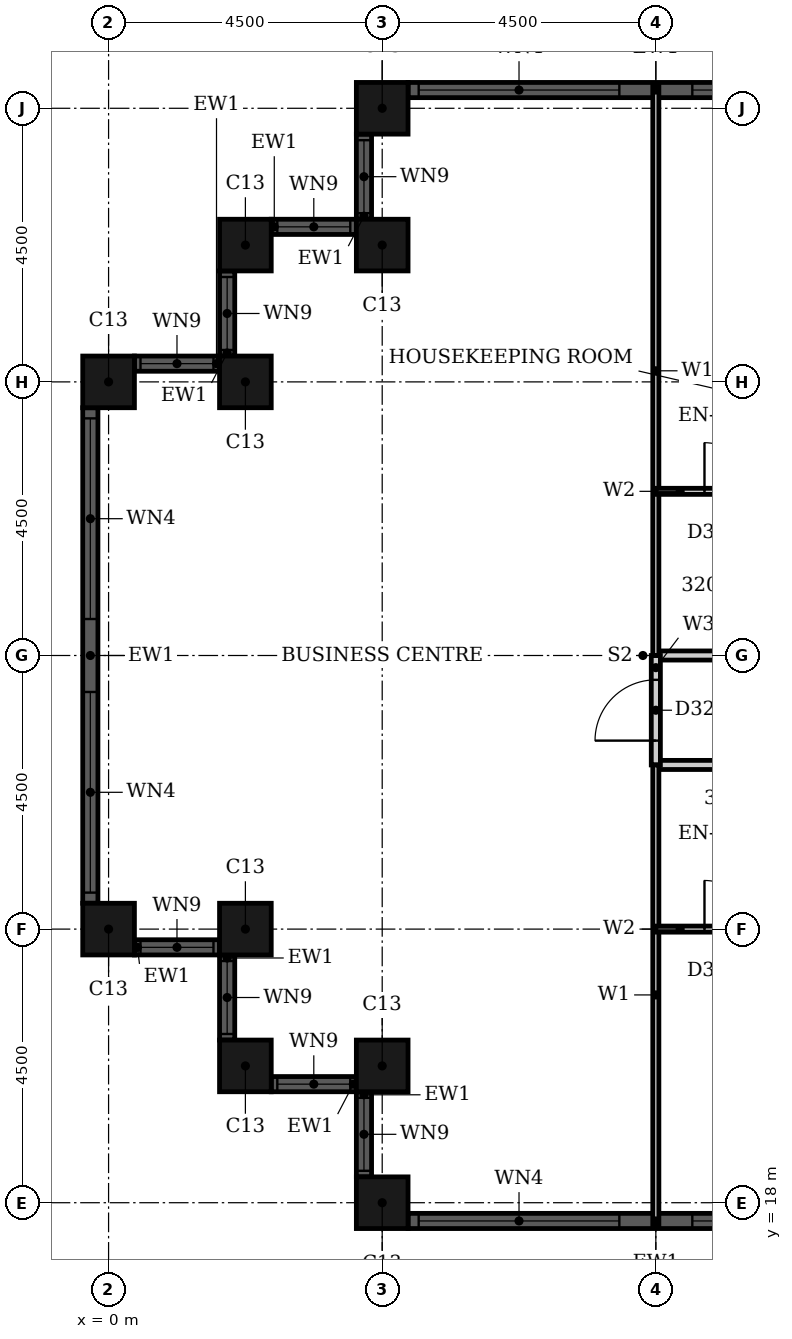
"""IFC4 building model, lengths in metres.
Left out: names, types, materials, properties, quantities, classifications, styles, units other than length and angle.
Written with IfcOpenShell. Run it as: python <this file> out.ifc"""

import sys

from ifc_helpers import new_model, si_unit, direction, frame, frame_2d, origin, origin_2d, place, context, subcontext, project, spatial, rectangle, hollow_rectangle, extrude, element, fill, save


model = new_model("IFC4")
c1 = context("Model", 3, precision=1e-05, world=origin(), true_north=direction((0.0, 1.0)))
c2 = subcontext(c1, "Body", "Model", "MODEL_VIEW")
j1 = project(units=[si_unit("LENGTHUNIT", "METRE"), si_unit("PLANEANGLEUNIT", "RADIAN")], contexts=[c1])
p1 = place(None, origin())
s1 = spatial("IfcSite", under=j1, at=p1, CompositionType="ELEMENT")
p2 = place(p1, origin())
s2 = spatial("IfcBuilding", under=s1, at=p2, CompositionType="ELEMENT")
p3 = place(p2, frame((0.0, 0.0, 129.6)))
s3 = spatial("IfcBuildingStorey", under=s2, at=p3, CompositionType="ELEMENT", Elevation=129.6)
for number, where, z_axis, x_axis in (
    (1, (4.5, 36.0, 0.0), (0.0, 0.0, 1.0), (1.0, 0.0, 0.0)),
    (2, (4.5, 33.75, 0.0), (0.0, 0.0, 1.0), (1.0, 0.0, 0.0)),
    (3, (2.25, 33.75, 0.0), (0.0, 0.0, 1.0), (1.0, 0.0, 0.0)),
    (4, (2.25, 31.5, 0.0), (0.0, 0.0, 1.0), (1.0, 0.0, 0.0)),
    (5, (0.0, 31.5, 0.0), (0.0, 0.0, 1.0), (1.0, 0.0, 0.0)),
    (6, (0.0, 22.5, 0.0), (0.0, 0.0, 1.0), (1.0, 0.0, 0.0)),
    (7, (2.25, 22.5, 0.0), (0.0, 0.0, 1.0), (1.0, 0.0, 0.0)),
    (8, (2.25, 20.25, 0.0), (0.0, 0.0, 1.0), (1.0, 0.0, 0.0)),
    (9, (4.5, 20.25, 0.0), (0.0, 0.0, 1.0), (1.0, 0.0, 0.0)),
    (10, (4.5, 18.0, 0.0), (0.0, 0.0, 1.0), (1.0, 0.0, 0.0)),
):
    element("IfcColumn", number, at=place(p3, frame(where, z_axis=z_axis, x_axis=x_axis)), inside=s3, PredefinedType="COLUMN", context=c2, shape_type="SweptSolid", body=[
        extrude(hollow_rectangle(XDim=0.85, YDim=0.85, WallThickness=0.026, at=origin_2d()), origin(), (0.0, 0.0, 1.0), 3.6),
    ])
p4 = place(p3, frame((13.075, 36.3, 0.0), z_axis=(0.0, 0.0, 1.0), x_axis=(-1.0, 0.0, 0.0)))
e11 = element("IfcWall", 11, at=p4, inside=s3, PredefinedType="SOLIDWALL", context=c2, shape_type="SweptSolid", body=[
    extrude(rectangle(XDim=8.15, YDim=0.25, at=frame_2d((4.075, 0.0))), origin(), (0.0, 0.0, 1.0), 3.6),
])
p5 = place(p4, frame((0.175, 0.0, 0.9)))
e12 = element("IfcOpeningElement", 12, at=p5, cuts=e11, PredefinedType="OPENING", context=c2, shape_type="SweptSolid", body=[
    extrude(rectangle(XDim=3.3, YDim=2.08, at=frame_2d((1.65, 1.04))), frame((0.0, 0.135, 0.0), z_axis=(0.0, -1.0, 0.0), x_axis=(1.0, 0.0, 0.0)), (0.0, 0.0, 1.0), 0.27),
])
p6 = place(p4, frame((4.675, 0.0, 0.9)))
e13 = element("IfcOpeningElement", 13, at=p6, cuts=e11, PredefinedType="OPENING", context=c2, shape_type="SweptSolid", body=[
    extrude(rectangle(XDim=3.3, YDim=2.08, at=frame_2d((1.65, 1.04))), frame((0.0, 0.135, 0.0), z_axis=(0.0, -1.0, 0.0), x_axis=(1.0, 0.0, 0.0)), (0.0, 0.0, 1.0), 0.27),
])
p7 = place(p3, frame((4.2, 35.575, 0.0), z_axis=(0.0, 0.0, 1.0), x_axis=(0.0, -1.0, 0.0)))
e14 = element("IfcWall", 14, at=p7, inside=s3, PredefinedType="SOLIDWALL", context=c2, shape_type="SweptSolid", body=[
    extrude(rectangle(XDim=1.4, YDim=0.25, at=frame_2d((0.7, 0.0))), origin(), (0.0, 0.0, 1.0), 3.6),
])
p8 = place(p7, frame((0.1, 0.0, 0.9)))
e15 = element("IfcOpeningElement", 15, at=p8, cuts=e14, PredefinedType="OPENING", context=c2, shape_type="SweptSolid", body=[
    extrude(rectangle(XDim=1.2, YDim=2.08, at=frame_2d((0.6, 1.04))), frame((0.0, 0.135, 0.0), z_axis=(0.0, -1.0, 0.0), x_axis=(1.0, 0.0, 0.0)), (0.0, 0.0, 1.0), 0.27),
])
p9 = place(p3, frame((4.075, 34.05, 0.0), z_axis=(0.0, 0.0, 1.0), x_axis=(-1.0, 0.0, 0.0)))
e16 = element("IfcWall", 16, at=p9, inside=s3, PredefinedType="SOLIDWALL", context=c2, shape_type="SweptSolid", body=[
    extrude(rectangle(XDim=1.4, YDim=0.25, at=frame_2d((0.7, 0.0))), origin(), (0.0, 0.0, 1.0), 3.6),
])
p10 = place(p9, frame((0.1, 0.0, 0.9)))
e17 = element("IfcOpeningElement", 17, at=p10, cuts=e16, PredefinedType="OPENING", context=c2, shape_type="SweptSolid", body=[
    extrude(rectangle(XDim=1.2, YDim=2.08, at=frame_2d((0.6, 1.04))), frame((0.0, 0.135, 0.0), z_axis=(0.0, -1.0, 0.0), x_axis=(1.0, 0.0, 0.0)), (0.0, 0.0, 1.0), 0.27),
])
p11 = place(p3, frame((1.95, 33.325, 0.0), z_axis=(0.0, 0.0, 1.0), x_axis=(0.0, -1.0, 0.0)))
e18 = element("IfcWall", 18, at=p11, inside=s3, PredefinedType="SOLIDWALL", context=c2, shape_type="SweptSolid", body=[
    extrude(rectangle(XDim=1.4, YDim=0.25, at=frame_2d((0.7, 0.0))), origin(), (0.0, 0.0, 1.0), 3.6),
])
p12 = place(p11, frame((0.1, 0.0, 0.9)))
e19 = element("IfcOpeningElement", 19, at=p12, cuts=e18, PredefinedType="OPENING", context=c2, shape_type="SweptSolid", body=[
    extrude(rectangle(XDim=1.2, YDim=2.08, at=frame_2d((0.6, 1.04))), frame((0.0, 0.135, 0.0), z_axis=(0.0, -1.0, 0.0), x_axis=(1.0, 0.0, 0.0)), (0.0, 0.0, 1.0), 0.27),
])
p13 = place(p3, frame((1.825, 31.8, 0.0), z_axis=(0.0, 0.0, 1.0), x_axis=(-1.0, 0.0, 0.0)))
e20 = element("IfcWall", 20, at=p13, inside=s3, PredefinedType="SOLIDWALL", context=c2, shape_type="SweptSolid", body=[
    extrude(rectangle(XDim=1.4, YDim=0.25, at=frame_2d((0.7, 0.0))), origin(), (0.0, 0.0, 1.0), 3.6),
])
p14 = place(p13, frame((0.1, 0.0, 0.9)))
e21 = element("IfcOpeningElement", 21, at=p14, cuts=e20, PredefinedType="OPENING", context=c2, shape_type="SweptSolid", body=[
    extrude(rectangle(XDim=1.2, YDim=2.08, at=frame_2d((0.6, 1.04))), frame((0.0, 0.135, 0.0), z_axis=(0.0, -1.0, 0.0), x_axis=(1.0, 0.0, 0.0)), (0.0, 0.0, 1.0), 0.27),
])
p15 = place(p3, frame((-0.3, 31.075, 0.0), z_axis=(0.0, 0.0, 1.0), x_axis=(0.0, -1.0, 0.0)))
e22 = element("IfcWall", 22, at=p15, inside=s3, PredefinedType="SOLIDWALL", context=c2, shape_type="SweptSolid", body=[
    extrude(rectangle(XDim=8.15, YDim=0.25, at=frame_2d((4.075, 0.0))), origin(), (0.0, 0.0, 1.0), 3.6),
])
p16 = place(p15, frame((0.175, 0.0, 0.9)))
e23 = element("IfcOpeningElement", 23, at=p16, cuts=e22, PredefinedType="OPENING", context=c2, shape_type="SweptSolid", body=[
    extrude(rectangle(XDim=3.3, YDim=2.08, at=frame_2d((1.65, 1.04))), frame((0.0, 0.135, 0.0), z_axis=(0.0, -1.0, 0.0), x_axis=(1.0, 0.0, 0.0)), (0.0, 0.0, 1.0), 0.27),
])
p17 = place(p15, frame((4.675, 0.0, 0.9)))
e24 = element("IfcOpeningElement", 24, at=p17, cuts=e22, PredefinedType="OPENING", context=c2, shape_type="SweptSolid", body=[
    extrude(rectangle(XDim=3.3, YDim=2.08, at=frame_2d((1.65, 1.04))), frame((0.0, 0.135, 0.0), z_axis=(0.0, -1.0, 0.0), x_axis=(1.0, 0.0, 0.0)), (0.0, 0.0, 1.0), 0.27),
])
p18 = place(p3, frame((0.425, 22.2, 0.0), z_axis=(0.0, 0.0, 1.0), x_axis=(1.0, 0.0, 0.0)))
e25 = element("IfcWall", 25, at=p18, inside=s3, PredefinedType="SOLIDWALL", context=c2, shape_type="SweptSolid", body=[
    extrude(rectangle(XDim=1.4, YDim=0.25, at=frame_2d((0.7, 0.0))), origin(), (0.0, 0.0, 1.0), 3.6),
])
p19 = place(p18, frame((0.1, 0.0, 0.9)))
e26 = element("IfcOpeningElement", 26, at=p19, cuts=e25, PredefinedType="OPENING", context=c2, shape_type="SweptSolid", body=[
    extrude(rectangle(XDim=1.2, YDim=2.08, at=frame_2d((0.6, 1.04))), frame((0.0, 0.135, 0.0), z_axis=(0.0, -1.0, 0.0), x_axis=(1.0, 0.0, 0.0)), (0.0, 0.0, 1.0), 0.27),
])
p20 = place(p3, frame((1.95, 22.075, 0.0), z_axis=(0.0, 0.0, 1.0), x_axis=(0.0, -1.0, 0.0)))
e27 = element("IfcWall", 27, at=p20, inside=s3, PredefinedType="SOLIDWALL", context=c2, shape_type="SweptSolid", body=[
    extrude(rectangle(XDim=1.4, YDim=0.25, at=frame_2d((0.7, 0.0))), origin(), (0.0, 0.0, 1.0), 3.6),
])
p21 = place(p20, frame((0.1, 0.0, 0.9)))
e28 = element("IfcOpeningElement", 28, at=p21, cuts=e27, PredefinedType="OPENING", context=c2, shape_type="SweptSolid", body=[
    extrude(rectangle(XDim=1.2, YDim=2.08, at=frame_2d((0.6, 1.04))), frame((0.0, 0.135, 0.0), z_axis=(0.0, -1.0, 0.0), x_axis=(1.0, 0.0, 0.0)), (0.0, 0.0, 1.0), 0.27),
])
p22 = place(p3, frame((2.675, 19.95, 0.0), z_axis=(0.0, 0.0, 1.0), x_axis=(1.0, 0.0, 0.0)))
e29 = element("IfcWall", 29, at=p22, inside=s3, PredefinedType="SOLIDWALL", context=c2, shape_type="SweptSolid", body=[
    extrude(rectangle(XDim=1.4, YDim=0.25, at=frame_2d((0.7, 0.0))), origin(), (0.0, 0.0, 1.0), 3.6),
])
p23 = place(p22, frame((0.1, 0.0, 0.9)))
e30 = element("IfcOpeningElement", 30, at=p23, cuts=e29, PredefinedType="OPENING", context=c2, shape_type="SweptSolid", body=[
    extrude(rectangle(XDim=1.2, YDim=2.08, at=frame_2d((0.6, 1.04))), frame((0.0, 0.135, 0.0), z_axis=(0.0, -1.0, 0.0), x_axis=(1.0, 0.0, 0.0)), (0.0, 0.0, 1.0), 0.27),
])
p24 = place(p3, frame((4.2, 19.825, 0.0), z_axis=(0.0, 0.0, 1.0), x_axis=(0.0, -1.0, 0.0)))
e31 = element("IfcWall", 31, at=p24, inside=s3, PredefinedType="SOLIDWALL", context=c2, shape_type="SweptSolid", body=[
    extrude(rectangle(XDim=1.4, YDim=0.25, at=frame_2d((0.7, 0.0))), origin(), (0.0, 0.0, 1.0), 3.6),
])
p25 = place(p24, frame((0.1, 0.0, 0.9)))
e32 = element("IfcOpeningElement", 32, at=p25, cuts=e31, PredefinedType="OPENING", context=c2, shape_type="SweptSolid", body=[
    extrude(rectangle(XDim=1.2, YDim=2.08, at=frame_2d((0.6, 1.04))), frame((0.0, 0.135, 0.0), z_axis=(0.0, -1.0, 0.0), x_axis=(1.0, 0.0, 0.0)), (0.0, 0.0, 1.0), 0.27),
])
p26 = place(p3, frame((4.925, 17.7, 0.0), z_axis=(0.0, 0.0, 1.0), x_axis=(1.0, 0.0, 0.0)))
e33 = element("IfcWall", 33, at=p26, inside=s3, PredefinedType="SOLIDWALL", context=c2, shape_type="SweptSolid", body=[
    extrude(rectangle(XDim=8.15, YDim=0.25, at=frame_2d((4.075, 0.0))), origin(), (0.0, 0.0, 1.0), 3.6),
])
p27 = place(p26, frame((0.175, 0.0, 0.9)))
e34 = element("IfcOpeningElement", 34, at=p27, cuts=e33, PredefinedType="OPENING", context=c2, shape_type="SweptSolid", body=[
    extrude(rectangle(XDim=3.3, YDim=2.08, at=frame_2d((1.65, 1.04))), frame((0.0, 0.135, 0.0), z_axis=(0.0, -1.0, 0.0), x_axis=(1.0, 0.0, 0.0)), (0.0, 0.0, 1.0), 0.27),
])
p28 = place(p26, frame((4.675, 0.0, 0.9)))
e35 = element("IfcOpeningElement", 35, at=p28, cuts=e33, PredefinedType="OPENING", context=c2, shape_type="SweptSolid", body=[
    extrude(rectangle(XDim=3.3, YDim=2.08, at=frame_2d((1.65, 1.04))), frame((0.0, 0.135, 0.0), z_axis=(0.0, -1.0, 0.0), x_axis=(1.0, 0.0, 0.0)), (0.0, 0.0, 1.0), 0.27),
])
p29 = place(p3, frame((9.0, 25.2, 0.0), z_axis=(0.0, 0.0, 1.0), x_axis=(1.0, 0.0, 0.0)))
e36 = element("IfcWall", 36, at=p29, inside=s3, PredefinedType="PARTITIONING", context=c2, shape_type="SweptSolid", body=[
    extrude(rectangle(XDim=7.2, YDim=0.15, at=frame_2d((3.6, 0.0))), origin(), (0.0, 0.0, 1.0), 3.3),
])
p30 = place(p29, frame((2.95, 0.0, 0.0)))
e37 = element("IfcOpeningElement", 37, at=p30, cuts=e36, PredefinedType="OPENING", context=c2, shape_type="SweptSolid", body=[
    extrude(rectangle(XDim=1.0, YDim=2.1, at=frame_2d((0.5, 1.05))), frame((0.0, 0.085, 0.0), z_axis=(0.0, -1.0, 0.0), x_axis=(1.0, 0.0, 0.0)), (0.0, 0.0, 1.0), 0.17),
])
p31 = place(p3, frame((9.0, 27.0, 0.0), z_axis=(0.0, 0.0, 1.0), x_axis=(1.0, 0.0, 0.0)))
e38 = element("IfcWall", 38, at=p31, inside=s3, PredefinedType="PARTITIONING", context=c2, shape_type="SweptSolid", body=[
    extrude(rectangle(XDim=7.2, YDim=0.15, at=frame_2d((3.6, 0.0))), origin(), (0.0, 0.0, 1.0), 2.58),
])
p32 = place(p31, frame((2.95, 0.0, 0.0)))
e39 = element("IfcOpeningElement", 39, at=p32, cuts=e38, PredefinedType="OPENING", context=c2, shape_type="SweptSolid", body=[
    extrude(rectangle(XDim=1.0, YDim=2.1, at=frame_2d((0.5, 1.05))), frame((0.0, 0.085, 0.0), z_axis=(0.0, -1.0, 0.0), x_axis=(1.0, 0.0, 0.0)), (0.0, 0.0, 1.0), 0.17),
])
p33 = place(p3, frame((9.0, 25.2, 0.0), z_axis=(0.0, 0.0, 1.0), x_axis=(0.0, 1.0, 0.0)))
e40 = element("IfcWall", 40, at=p33, inside=s3, PredefinedType="PARTITIONING", context=c2, shape_type="SweptSolid", body=[
    extrude(rectangle(XDim=1.8, YDim=0.15, at=frame_2d((0.9, 0.0))), origin(), (0.0, 0.0, 1.0), 3.3),
])
p34 = place(p33, frame((0.4, 0.0, 0.0)))
e41 = element("IfcOpeningElement", 41, at=p34, cuts=e40, PredefinedType="OPENING", context=c2, shape_type="SweptSolid", body=[
    extrude(rectangle(XDim=1.0, YDim=2.1, at=frame_2d((0.5, 1.05))), frame((0.0, 0.085, 0.0), z_axis=(0.0, -1.0, 0.0), x_axis=(1.0, 0.0, 0.0)), (0.0, 0.0, 1.0), 0.17),
])
p35 = place(p3, frame((9.0, 27.0, 0.0), z_axis=(0.0, 0.0, 1.0), x_axis=(0.0, 1.0, 0.0)))
e42 = element("IfcWall", 42, at=p35, inside=s3, PredefinedType="PARTITIONING", context=c2, shape_type="SweptSolid", body=[
    extrude(rectangle(XDim=9.365, YDim=0.1, at=frame_2d((4.683, 0.0))), origin(), (0.0, 0.0, 1.0), 3.3),
])
p36 = place(p3, frame((9.0, 17.635, 0.0), z_axis=(0.0, 0.0, 1.0), x_axis=(0.0, 1.0, 0.0)))
e43 = element("IfcWall", 43, at=p36, inside=s3, PredefinedType="PARTITIONING", context=c2, shape_type="SweptSolid", body=[
    extrude(rectangle(XDim=7.565, YDim=0.1, at=frame_2d((3.782, 0.0))), origin(), (0.0, 0.0, 1.0), 3.3),
])
p37 = place(p3, frame((9.0, 22.5, 0.0), z_axis=(0.0, 0.0, 1.0), x_axis=(1.0, 0.0, 0.0)))
e44 = element("IfcWall", 44, at=p37, inside=s3, PredefinedType="PARTITIONING", context=c2, shape_type="SweptSolid", body=[
    extrude(rectangle(XDim=2.4, YDim=0.1, at=frame_2d((1.2, 0.0))), origin(), (0.0, 0.0, 1.0), 2.58),
])
p38 = place(p37, frame((0.8, 0.0, 0.0)))
e45 = element("IfcOpeningElement", 45, at=p38, cuts=e44, PredefinedType="OPENING", context=c2, shape_type="SweptSolid", body=[
    extrude(rectangle(XDim=0.8, YDim=2.1, at=frame_2d((0.4, 1.05))), frame((0.0, 0.06, 0.0), z_axis=(0.0, -1.0, 0.0), x_axis=(1.0, 0.0, 0.0)), (0.0, 0.0, 1.0), 0.12),
])
p39 = place(p3, frame((9.0, 29.7, 0.0), z_axis=(0.0, 0.0, 1.0), x_axis=(1.0, 0.0, 0.0)))
e46 = element("IfcWall", 46, at=p39, inside=s3, PredefinedType="PARTITIONING", context=c2, shape_type="SweptSolid", body=[
    extrude(rectangle(XDim=2.4, YDim=0.1, at=frame_2d((1.2, 0.0))), origin(), (0.0, 0.0, 1.0), 3.3),
])
p40 = place(p39, frame((0.8, 0.0, 0.0)))
e47 = element("IfcOpeningElement", 47, at=p40, cuts=e46, PredefinedType="OPENING", context=c2, shape_type="SweptSolid", body=[
    extrude(rectangle(XDim=0.8, YDim=2.1, at=frame_2d((0.4, 1.05))), frame((0.0, 0.06, 0.0), z_axis=(0.0, -1.0, 0.0), x_axis=(1.0, 0.0, 0.0)), (0.0, 0.0, 1.0), 0.12),
])
p41 = place(p5, origin())
e48 = element("IfcWindow", 48, at=p41, inside=s3, PartitioningType="SINGLE_PANEL", PredefinedType="WINDOW", context=c2, shape_type="SweptSolid", body=[
    extrude(rectangle(XDim=3.3, YDim=2.08, at=frame_2d((1.65, 1.04))), frame((0.0, 0.03, 0.0), z_axis=(0.0, -1.0, 0.0), x_axis=(1.0, 0.0, 0.0)), (0.0, 0.0, 1.0), 0.06),
])
fill(e12, e48)
p42 = place(p6, origin())
e49 = element("IfcWindow", 49, at=p42, inside=s3, PartitioningType="SINGLE_PANEL", PredefinedType="WINDOW", context=c2, shape_type="SweptSolid", body=[
    extrude(rectangle(XDim=3.3, YDim=2.08, at=frame_2d((1.65, 1.04))), frame((0.0, 0.03, 0.0), z_axis=(0.0, -1.0, 0.0), x_axis=(1.0, 0.0, 0.0)), (0.0, 0.0, 1.0), 0.06),
])
fill(e13, e49)
p43 = place(p8, origin())
e50 = element("IfcWindow", 50, at=p43, inside=s3, PartitioningType="SINGLE_PANEL", PredefinedType="WINDOW", context=c2, shape_type="SweptSolid", body=[
    extrude(rectangle(XDim=1.2, YDim=2.08, at=frame_2d((0.6, 1.04))), frame((0.0, 0.03, 0.0), z_axis=(0.0, -1.0, 0.0), x_axis=(1.0, 0.0, 0.0)), (0.0, 0.0, 1.0), 0.06),
])
fill(e15, e50)
p44 = place(p10, origin())
e51 = element("IfcWindow", 51, at=p44, inside=s3, PartitioningType="SINGLE_PANEL", PredefinedType="WINDOW", context=c2, shape_type="SweptSolid", body=[
    extrude(rectangle(XDim=1.2, YDim=2.08, at=frame_2d((0.6, 1.04))), frame((0.0, 0.03, 0.0), z_axis=(0.0, -1.0, 0.0), x_axis=(1.0, 0.0, 0.0)), (0.0, 0.0, 1.0), 0.06),
])
fill(e17, e51)
p45 = place(p12, origin())
e52 = element("IfcWindow", 52, at=p45, inside=s3, PartitioningType="SINGLE_PANEL", PredefinedType="WINDOW", context=c2, shape_type="SweptSolid", body=[
    extrude(rectangle(XDim=1.2, YDim=2.08, at=frame_2d((0.6, 1.04))), frame((0.0, 0.03, 0.0), z_axis=(0.0, -1.0, 0.0), x_axis=(1.0, 0.0, 0.0)), (0.0, 0.0, 1.0), 0.06),
])
fill(e19, e52)
p46 = place(p14, origin())
e53 = element("IfcWindow", 53, at=p46, inside=s3, PartitioningType="SINGLE_PANEL", PredefinedType="WINDOW", context=c2, shape_type="SweptSolid", body=[
    extrude(rectangle(XDim=1.2, YDim=2.08, at=frame_2d((0.6, 1.04))), frame((0.0, 0.03, 0.0), z_axis=(0.0, -1.0, 0.0), x_axis=(1.0, 0.0, 0.0)), (0.0, 0.0, 1.0), 0.06),
])
fill(e21, e53)
p47 = place(p16, origin())
e54 = element("IfcWindow", 54, at=p47, inside=s3, PartitioningType="SINGLE_PANEL", PredefinedType="WINDOW", context=c2, shape_type="SweptSolid", body=[
    extrude(rectangle(XDim=3.3, YDim=2.08, at=frame_2d((1.65, 1.04))), frame((0.0, 0.03, 0.0), z_axis=(0.0, -1.0, 0.0), x_axis=(1.0, 0.0, 0.0)), (0.0, 0.0, 1.0), 0.06),
])
fill(e23, e54)
p48 = place(p17, origin())
e55 = element("IfcWindow", 55, at=p48, inside=s3, PartitioningType="SINGLE_PANEL", PredefinedType="WINDOW", context=c2, shape_type="SweptSolid", body=[
    extrude(rectangle(XDim=3.3, YDim=2.08, at=frame_2d((1.65, 1.04))), frame((0.0, 0.03, 0.0), z_axis=(0.0, -1.0, 0.0), x_axis=(1.0, 0.0, 0.0)), (0.0, 0.0, 1.0), 0.06),
])
fill(e24, e55)
p49 = place(p19, origin())
e56 = element("IfcWindow", 56, at=p49, inside=s3, PartitioningType="SINGLE_PANEL", PredefinedType="WINDOW", context=c2, shape_type="SweptSolid", body=[
    extrude(rectangle(XDim=1.2, YDim=2.08, at=frame_2d((0.6, 1.04))), frame((0.0, 0.03, 0.0), z_axis=(0.0, -1.0, 0.0), x_axis=(1.0, 0.0, 0.0)), (0.0, 0.0, 1.0), 0.06),
])
fill(e26, e56)
p50 = place(p21, origin())
e57 = element("IfcWindow", 57, at=p50, inside=s3, PartitioningType="SINGLE_PANEL", PredefinedType="WINDOW", context=c2, shape_type="SweptSolid", body=[
    extrude(rectangle(XDim=1.2, YDim=2.08, at=frame_2d((0.6, 1.04))), frame((0.0, 0.03, 0.0), z_axis=(0.0, -1.0, 0.0), x_axis=(1.0, 0.0, 0.0)), (0.0, 0.0, 1.0), 0.06),
])
fill(e28, e57)
p51 = place(p23, origin())
e58 = element("IfcWindow", 58, at=p51, inside=s3, PartitioningType="SINGLE_PANEL", PredefinedType="WINDOW", context=c2, shape_type="SweptSolid", body=[
    extrude(rectangle(XDim=1.2, YDim=2.08, at=frame_2d((0.6, 1.04))), frame((0.0, 0.03, 0.0), z_axis=(0.0, -1.0, 0.0), x_axis=(1.0, 0.0, 0.0)), (0.0, 0.0, 1.0), 0.06),
])
fill(e30, e58)
p52 = place(p25, origin())
e59 = element("IfcWindow", 59, at=p52, inside=s3, PartitioningType="SINGLE_PANEL", PredefinedType="WINDOW", context=c2, shape_type="SweptSolid", body=[
    extrude(rectangle(XDim=1.2, YDim=2.08, at=frame_2d((0.6, 1.04))), frame((0.0, 0.03, 0.0), z_axis=(0.0, -1.0, 0.0), x_axis=(1.0, 0.0, 0.0)), (0.0, 0.0, 1.0), 0.06),
])
fill(e32, e59)
p53 = place(p27, origin())
e60 = element("IfcWindow", 60, at=p53, inside=s3, PartitioningType="SINGLE_PANEL", PredefinedType="WINDOW", context=c2, shape_type="SweptSolid", body=[
    extrude(rectangle(XDim=3.3, YDim=2.08, at=frame_2d((1.65, 1.04))), frame((0.0, 0.03, 0.0), z_axis=(0.0, -1.0, 0.0), x_axis=(1.0, 0.0, 0.0)), (0.0, 0.0, 1.0), 0.06),
])
fill(e34, e60)
p54 = place(p28, origin())
e61 = element("IfcWindow", 61, at=p54, inside=s3, PartitioningType="SINGLE_PANEL", PredefinedType="WINDOW", context=c2, shape_type="SweptSolid", body=[
    extrude(rectangle(XDim=3.3, YDim=2.08, at=frame_2d((1.65, 1.04))), frame((0.0, 0.03, 0.0), z_axis=(0.0, -1.0, 0.0), x_axis=(1.0, 0.0, 0.0)), (0.0, 0.0, 1.0), 0.06),
])
fill(e35, e61)
p55 = place(p38, origin())
e62 = element("IfcDoor", 62, at=p55, inside=s3, OperationType="SINGLE_SWING_LEFT", PredefinedType="DOOR", context=c2, shape_type="SweptSolid", body=[
    extrude(rectangle(XDim=0.8, YDim=2.1, at=frame_2d((0.4, 1.05))), frame((0.0, 0.025, 0.0), z_axis=(0.0, -1.0, 0.0), x_axis=(1.0, 0.0, 0.0)), (0.0, 0.0, 1.0), 0.05),
])
fill(e45, e62)
p56 = place(p40, origin())
e63 = element("IfcDoor", 63, at=p56, inside=s3, OperationType="SINGLE_SWING_LEFT", PredefinedType="DOOR", context=c2, shape_type="SweptSolid", body=[
    extrude(rectangle(XDim=0.8, YDim=2.1, at=frame_2d((0.4, 1.05))), frame((0.0, 0.025, 0.0), z_axis=(0.0, -1.0, 0.0), x_axis=(1.0, 0.0, 0.0)), (0.0, 0.0, 1.0), 0.05),
])
fill(e47, e63)
p57 = place(p34, origin())
e64 = element("IfcDoor", 64, at=p57, inside=s3, OperationType="SINGLE_SWING_RIGHT", PredefinedType="DOOR", context=c2, shape_type="SweptSolid", body=[
    extrude(rectangle(XDim=1.0, YDim=2.1, at=frame_2d((0.5, 1.05))), frame((0.0, 0.025, 0.0), z_axis=(0.0, -1.0, 0.0), x_axis=(1.0, 0.0, 0.0)), (0.0, 0.0, 1.0), 0.05),
])
fill(e41, e64)
save(model, sys.argv[1])
